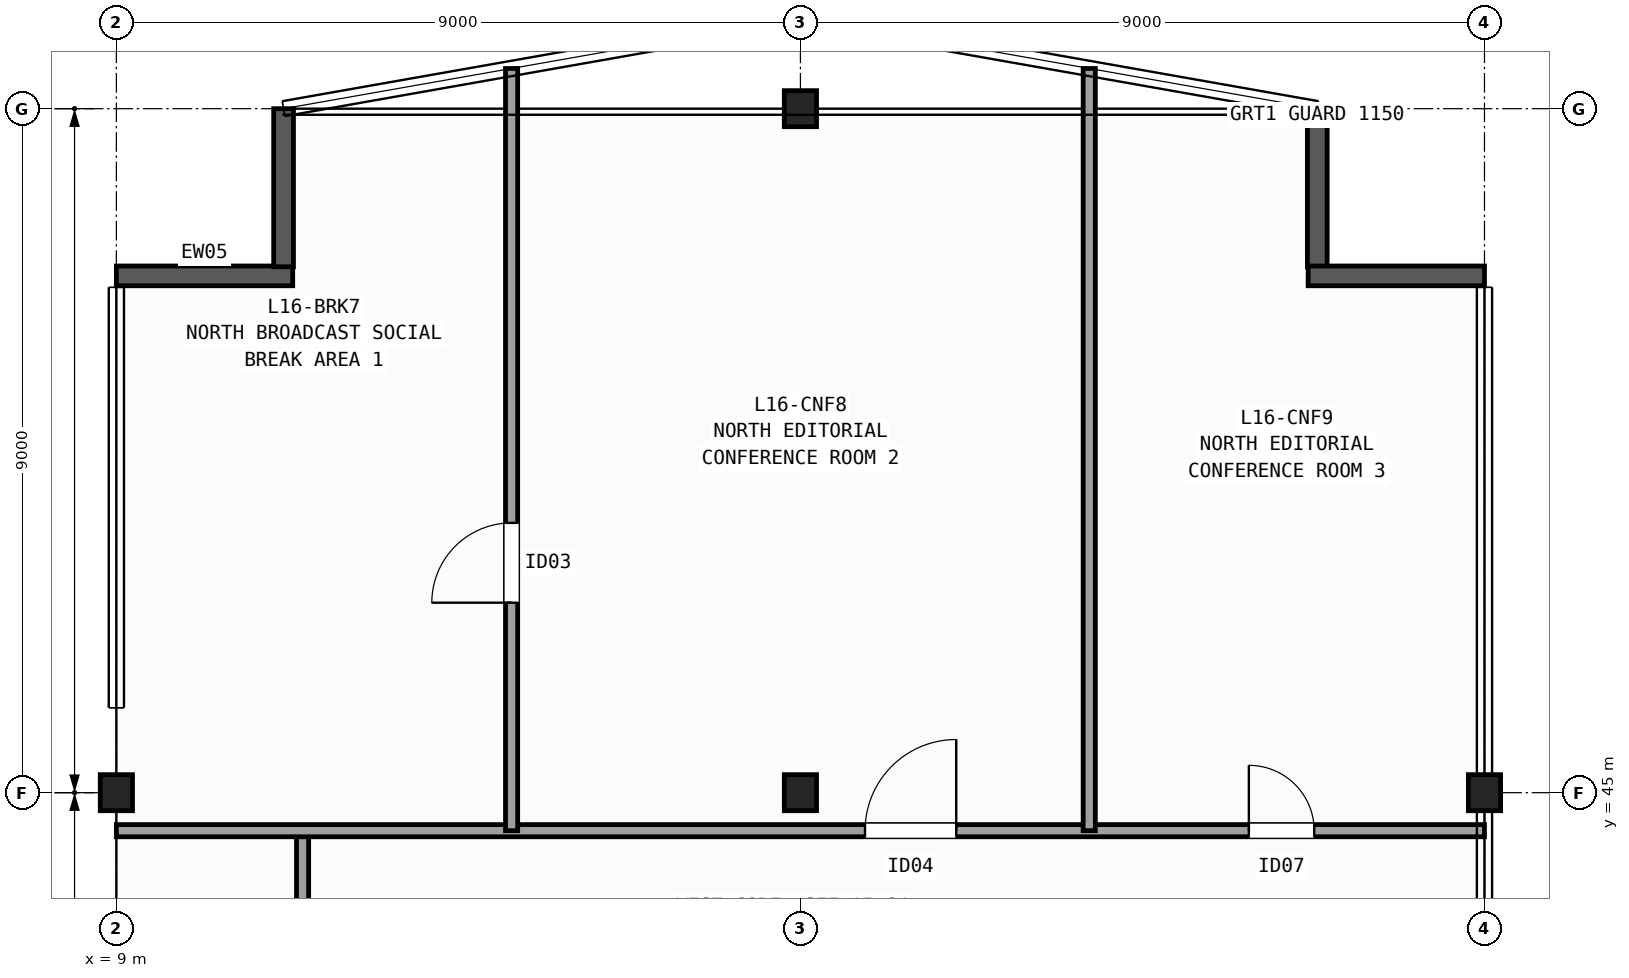
"""IFC4 building model, lengths in metres.
Left out: names, types, materials, properties, quantities, classifications, styles, units other than length and angle.
Written with IfcOpenShell. Run it as: python <this file> out.ifc"""

import sys

from ifc_helpers import new_model, si_unit, direction, frame, frame_2d, origin, origin_2d, place, context, subcontext, project, spatial, rectangle, i_section, extrude, element, fill, save


model = new_model("IFC4")
c1 = context("Model", 3, precision=1e-05, world=origin(), true_north=direction((0.0, 1.0)))
c2 = subcontext(c1, "Body", "Model", "MODEL_VIEW")
j1 = project(units=[si_unit("LENGTHUNIT", "METRE"), si_unit("PLANEANGLEUNIT", "RADIAN")], contexts=[c1])
p1 = place(None, origin())
s1 = spatial("IfcSite", under=j1, at=p1, CompositionType="ELEMENT")
p2 = place(p1, origin())
s2 = spatial("IfcBuilding", under=s1, at=p2, CompositionType="ELEMENT")
p3 = place(p2, frame((0.0, 0.0, 69.3)))
s3 = spatial("IfcBuildingStorey", under=s2, at=p3, CompositionType="ELEMENT", Elevation=69.3)
for number, where, z_axis, x_axis in (
    (1, (9.0, 45.0, 0.0), (0.0, 0.0, 1.0), (1.0, 0.0, 0.0)),
    (2, (18.0, 45.0, 0.0), (0.0, 0.0, 1.0), (1.0, 0.0, 0.0)),
    (3, (18.0, 54.0, 0.0), (0.0, 0.0, 1.0), (1.0, 0.0, 0.0)),
    (4, (27.0, 45.0, 0.0), (0.0, 0.0, 1.0), (1.0, 0.0, 0.0)),
):
    element("IfcColumn", number, at=place(p3, frame(where, z_axis=z_axis, x_axis=x_axis)), inside=s3, PredefinedType="COLUMN", context=c2, shape_type="SweptSolid", body=[
        extrude(i_section(OverallWidth=0.424, OverallDepth=0.474, WebThickness=0.048, FlangeThickness=0.077, FilletRadius=0.015, at=origin_2d()), origin(), (0.0, 0.0, 1.0), 3.7),
    ])
p4 = place(p3, frame((9.0, 51.8, 0.0), z_axis=(0.0, 0.0, 1.0), x_axis=(1.0, 0.0, 0.0)))
e5 = element("IfcWall", 5, at=p4, inside=s3, PredefinedType="SOLIDWALL", context=c2, shape_type="SweptSolid", body=[
    extrude(rectangle(XDim=2.32, YDim=0.26, at=frame_2d((1.16, 0.0))), origin(), (0.0, 0.0, 1.0), 3.42),
])
for number, where, z_axis, x_axis in (
    (6, (11.2, 51.92, 0.0), (0.0, 0.0, 1.0), (0.0, 1.0, 0.0)),
    (7, (24.8, 54.0, 0.0), (0.0, 0.0, 1.0), (0.0, -1.0, 0.0)),
):
    element("IfcWall", number, at=place(p3, frame(where, z_axis=z_axis, x_axis=x_axis)), inside=s3, PredefinedType="SOLIDWALL", context=c2, shape_type="SweptSolid", body=[
        extrude(rectangle(XDim=2.08, YDim=0.26, at=frame_2d((1.04, 0.0))), origin(), (0.0, 0.0, 1.0), 3.42),
    ])
p5 = place(p3, frame((24.68, 51.8, 0.0), z_axis=(0.0, 0.0, 1.0), x_axis=(1.0, 0.0, 0.0)))
e8 = element("IfcWall", 8, at=p5, inside=s3, PredefinedType="SOLIDWALL", context=c2, shape_type="SweptSolid", body=[
    extrude(rectangle(XDim=2.32, YDim=0.26, at=frame_2d((1.16, 0.0))), origin(), (0.0, 0.0, 1.0), 3.42),
])
p6 = place(p3, frame((11.45, 42.4, 0.0), z_axis=(0.0, 0.0, 1.0), x_axis=(0.0, 1.0, 0.0)))
e9 = element("IfcWall", 9, at=p6, inside=s3, PredefinedType="PARTITIONING", context=c2, shape_type="SweptSolid", body=[
    extrude(rectangle(XDim=2.1, YDim=0.16, at=frame_2d((1.05, 0.0))), origin(), (0.0, 0.0, 1.0), 3.42),
])
p7 = place(p3, frame((9.0, 44.5, 0.0), z_axis=(0.0, 0.0, 1.0), x_axis=(1.0, 0.0, 0.0)))
e10 = element("IfcWall", 10, at=p7, inside=s3, PredefinedType="PARTITIONING", context=c2, shape_type="SweptSolid", body=[
    extrude(rectangle(XDim=18.0, YDim=0.16, at=frame_2d((9.0, 0.0))), origin(), (0.0, 0.0, 1.0), 2.627),
])
p8 = place(p7, frame((9.85, 0.0, 0.0)))
e11 = element("IfcOpeningElement", 11, at=p8, cuts=e10, PredefinedType="OPENING", context=c2, shape_type="SweptSolid", body=[
    extrude(rectangle(XDim=1.2, YDim=2.15, at=frame_2d((0.6, 1.075))), frame((0.0, 0.09, 0.0), z_axis=(0.0, -1.0, 0.0), x_axis=(1.0, 0.0, 0.0)), (0.0, 0.0, 1.0), 0.18),
])
p9 = place(p7, frame((14.9, 0.0, 0.0)))
e12 = element("IfcOpeningElement", 12, at=p9, cuts=e10, PredefinedType="OPENING", context=c2, shape_type="SweptSolid", body=[
    extrude(rectangle(XDim=0.86, YDim=2.05, at=frame_2d((0.43, 1.025))), frame((0.0, 0.09, 0.0), z_axis=(0.0, -1.0, 0.0), x_axis=(1.0, 0.0, 0.0)), (0.0, 0.0, 1.0), 0.18),
])
p10 = place(p3, frame((14.2, 44.5, 0.0), z_axis=(0.0, 0.0, 1.0), x_axis=(0.0, 1.0, 0.0)))
e13 = element("IfcWall", 13, at=p10, inside=s3, PredefinedType="PARTITIONING", context=c2, shape_type="SweptSolid", body=[
    extrude(rectangle(XDim=10.029, YDim=0.16, at=frame_2d((5.015, 0.0))), origin(), (0.0, 0.0, 1.0), 3.42),
])
p11 = place(p10, frame((3.0, 0.0, 0.0)))
e14 = element("IfcOpeningElement", 14, at=p11, cuts=e13, PredefinedType="OPENING", context=c2, shape_type="SweptSolid", body=[
    extrude(rectangle(XDim=1.05, YDim=2.15, at=frame_2d((0.525, 1.075))), frame((0.0, 0.09, 0.0), z_axis=(0.0, -1.0, 0.0), x_axis=(1.0, 0.0, 0.0)), (0.0, 0.0, 1.0), 0.18),
])
p12 = place(p3, frame((21.8, 44.5, 0.0), z_axis=(0.0, 0.0, 1.0), x_axis=(0.0, 1.0, 0.0)))
e15 = element("IfcWall", 15, at=p12, inside=s3, PredefinedType="PARTITIONING", context=c2, shape_type="SweptSolid", body=[
    extrude(rectangle(XDim=10.029, YDim=0.16, at=frame_2d((5.015, 0.0))), origin(), (0.0, 0.0, 1.0), 3.42),
])
p13 = place(p11, origin())
e16 = element("IfcDoor", 16, at=p13, inside=s3, OperationType="SINGLE_SWING_LEFT", PredefinedType="DOOR", context=c2, shape_type="SweptSolid", body=[
    extrude(rectangle(XDim=1.05, YDim=2.15, at=frame_2d((0.525, 1.075))), frame((0.0, 0.025, 0.0), z_axis=(0.0, -1.0, 0.0), x_axis=(1.0, 0.0, 0.0)), (0.0, 0.0, 1.0), 0.05),
])
fill(e14, e16)
p14 = place(p8, origin())
e17 = element("IfcDoor", 17, at=p14, inside=s3, OperationType="SINGLE_SWING_RIGHT", PredefinedType="DOOR", context=c2, shape_type="SweptSolid", body=[
    extrude(rectangle(XDim=1.2, YDim=2.15, at=frame_2d((0.6, 1.075))), frame((0.0, 0.025, 0.0), z_axis=(0.0, -1.0, 0.0), x_axis=(1.0, 0.0, 0.0)), (0.0, 0.0, 1.0), 0.05),
])
fill(e11, e17)
p15 = place(p9, origin())
e18 = element("IfcDoor", 18, at=p15, inside=s3, OperationType="SINGLE_SWING_LEFT", PredefinedType="DOOR", context=c2, shape_type="SweptSolid", body=[
    extrude(rectangle(XDim=0.86, YDim=2.05, at=frame_2d((0.43, 1.025))), frame((0.0, 0.025, 0.0), z_axis=(0.0, -1.0, 0.0), x_axis=(1.0, 0.0, 0.0)), (0.0, 0.0, 1.0), 0.05),
])
fill(e12, e18)
save(model, sys.argv[1])
